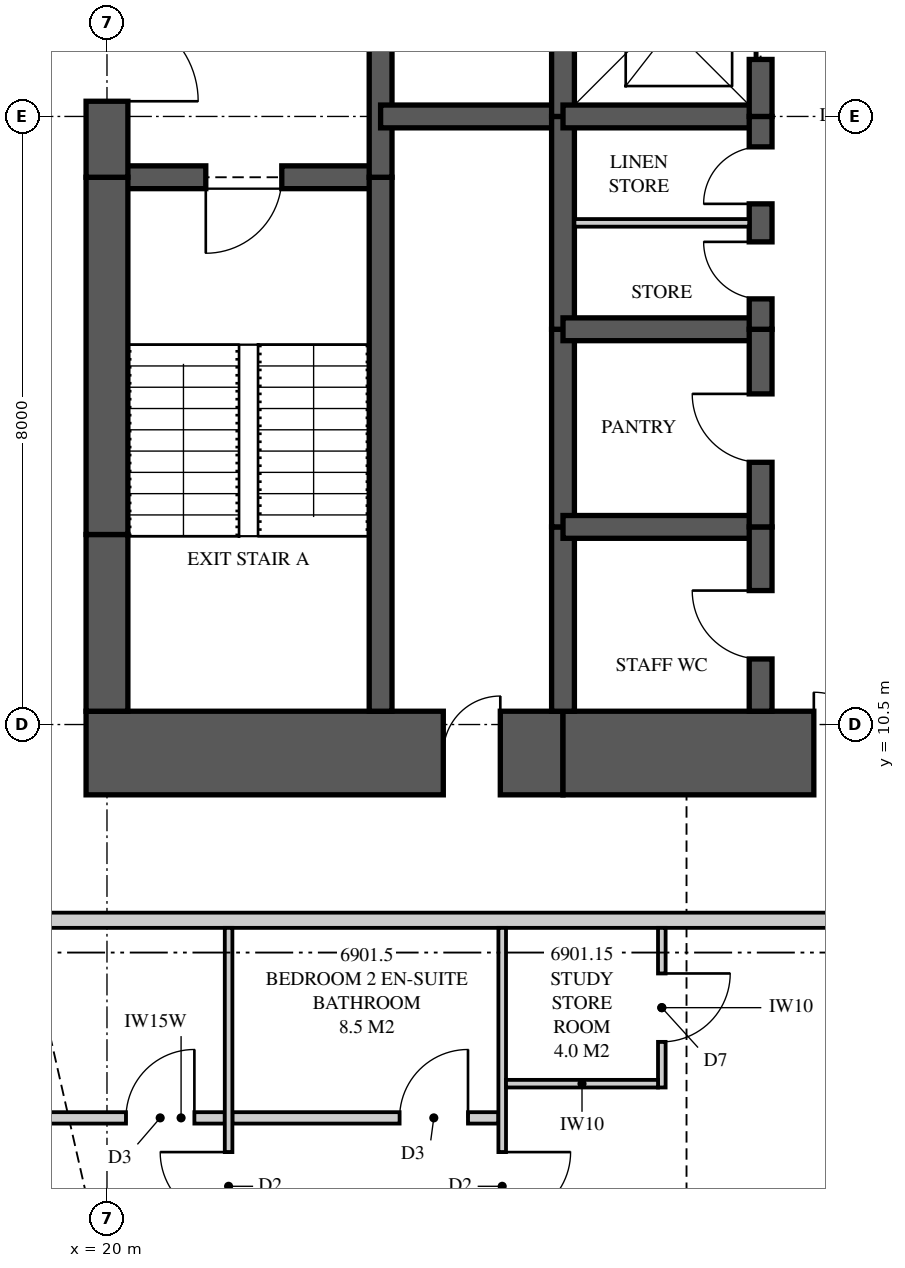
"""IFC4 building model, lengths in metres.
Left out: names, types, materials, properties, quantities, classifications, styles, units other than length and angle.
Written with IfcOpenShell. Run it as: python <this file> out.ifc"""

import sys

from ifc_helpers import new_model, si_unit, direction, frame, frame_2d, origin, place, context, subcontext, project, spatial, polyline, rectangle, outline, extrude, element, fill, save


model = new_model("IFC4")
c1 = context("Model", 3, precision=1e-05, world=origin(), true_north=direction((0.0, 1.0)))
c2 = subcontext(c1, "Body", "Model", "MODEL_VIEW")
j1 = project(units=[si_unit("LENGTHUNIT", "METRE"), si_unit("PLANEANGLEUNIT", "RADIAN")], contexts=[c1])
p1 = place(None, origin())
s1 = spatial("IfcSite", under=j1, at=p1, CompositionType="ELEMENT")
p2 = place(p1, origin())
s2 = spatial("IfcBuilding", under=s1, at=p2, CompositionType="ELEMENT")
p3 = place(p2, frame((0.0, 0.0, 252.95)))
s3 = spatial("IfcBuildingStorey", under=s2, at=p3, CompositionType="ELEMENT", Elevation=252.95)
p4 = place(p3, frame((19.725, 10.125, 0.0), z_axis=(0.0, 0.0, 1.0), x_axis=(1.0, 0.0, 0.0)))
e1 = element("IfcWall", 1, at=p4, inside=s3, PredefinedType="SHEAR", context=c2, shape_type="SweptSolid", body=[
    extrude(rectangle(XDim=6.275, YDim=1.1, at=frame_2d((3.137, 0.0))), origin(), (0.0, 0.0, 1.0), 3.5),
])
p5 = place(p4, frame((4.7, 0.0, 0.0)))
e2 = element("IfcOpeningElement", 2, at=p5, cuts=e1, PredefinedType="OPENING", context=c2, shape_type="SweptSolid", body=[
    extrude(rectangle(XDim=0.75, YDim=2.1, at=frame_2d((0.375, 1.05))), frame((0.0, 0.56, 0.0), z_axis=(0.0, -1.0, 0.0), x_axis=(1.0, 0.0, 0.0)), (0.0, 0.0, 1.0), 1.12),
])
p6 = place(p3, frame((26.0, 10.125, 0.0), z_axis=(0.0, 0.0, 1.0), x_axis=(1.0, 0.0, 0.0)))
e3 = element("IfcWall", 3, at=p6, inside=s3, PredefinedType="SHEAR", context=c2, shape_type="SweptSolid", body=[
    extrude(rectangle(XDim=5.6, YDim=1.1, at=frame_2d((2.8, 0.0))), origin(), (0.0, 0.0, 1.0), 3.5),
])
p7 = place(p6, frame((3.3, 0.0, 0.0)))
e4 = element("IfcOpeningElement", 4, at=p7, cuts=e3, PredefinedType="OPENING", context=c2, shape_type="SweptSolid", body=[
    extrude(rectangle(XDim=1.6, YDim=2.1, at=frame_2d((0.8, 1.05))), frame((0.0, 0.56, 0.0), z_axis=(0.0, -1.0, 0.0), x_axis=(1.0, 0.0, 0.0)), (0.0, 0.0, 1.0), 1.12),
])
p8 = place(p3, frame((20.0, 23.3, 0.0), z_axis=(0.0, 0.0, 1.0), x_axis=(0.0, -1.0, 0.0)))
e5 = element("IfcWall", 5, at=p8, inside=s3, PredefinedType="SHEAR", context=c2, shape_type="SweptSolid", body=[
    extrude(rectangle(XDim=5.6, YDim=0.55, at=frame_2d((2.8, 0.0))), origin(), (0.0, 0.0, 1.0), 3.5),
])
p9 = place(p8, frame((3.4, 0.0, 0.0)))
e6 = element("IfcOpeningElement", 6, at=p9, cuts=e5, PredefinedType="OPENING", context=c2, shape_type="SweptSolid", body=[
    extrude(rectangle(XDim=1.2, YDim=2.2, at=frame_2d((0.6, 1.1))), frame((0.0, 0.285, 0.0), z_axis=(0.0, -1.0, 0.0), x_axis=(1.0, 0.0, 0.0)), (0.0, 0.0, 1.0), 0.57),
])
p10 = place(p3, frame((20.0, 17.7, 0.0), z_axis=(0.0, 0.0, 1.0), x_axis=(0.0, -1.0, 0.0)))
e7 = element("IfcWall", 7, at=p10, inside=s3, PredefinedType="SHEAR", context=c2, shape_type="SweptSolid", body=[
    extrude(rectangle(XDim=4.7, YDim=0.55, at=frame_2d((2.35, 0.0))), origin(), (0.0, 0.0, 1.0), 3.5),
])
p11 = place(p3, frame((20.0, 13.0, 0.0), z_axis=(0.0, 0.0, 1.0), x_axis=(0.0, -1.0, 0.0)))
e8 = element("IfcWall", 8, at=p11, inside=s3, PredefinedType="SHEAR", context=c2, shape_type="SweptSolid", body=[
    extrude(rectangle(XDim=2.325, YDim=0.55, at=frame_2d((1.163, 0.0))), origin(), (0.0, 0.0, 1.0), 3.5),
])
p12 = place(p3, frame((23.6, 10.675, 0.0), z_axis=(0.0, 0.0, 1.0), x_axis=(0.0, 1.0, 0.0)))
e9 = element("IfcWall", 9, at=p12, inside=s3, PredefinedType="SHEAR", context=c2, shape_type="SweptSolid", body=[
    extrude(rectangle(XDim=7.025, YDim=0.3, at=frame_2d((3.512, 0.0))), origin(), (0.0, 0.0, 1.0), 3.5),
])
p13 = place(p3, frame((23.6, 17.7, 0.0), z_axis=(0.0, 0.0, 1.0), x_axis=(0.0, 1.0, 0.0)))
e10 = element("IfcWall", 10, at=p13, inside=s3, PredefinedType="SHEAR", context=c2, shape_type="SweptSolid", body=[
    extrude(rectangle(XDim=5.6, YDim=0.3, at=frame_2d((2.8, 0.0))), origin(), (0.0, 0.0, 1.0), 3.5),
])
p14 = place(p3, frame((26.0, 10.675, 0.0), z_axis=(0.0, 0.0, 1.0), x_axis=(0.0, 1.0, 0.0)))
e11 = element("IfcWall", 11, at=p14, inside=s3, PredefinedType="SHEAR", context=c2, shape_type="SweptSolid", body=[
    extrude(rectangle(XDim=2.425, YDim=0.3, at=frame_2d((1.212, 0.0))), origin(), (0.0, 0.0, 1.0), 3.5),
])
p15 = place(p3, frame((26.0, 13.1, 0.0), z_axis=(0.0, 0.0, 1.0), x_axis=(0.0, 1.0, 0.0)))
e12 = element("IfcWall", 12, at=p15, inside=s3, PredefinedType="SHEAR", context=c2, shape_type="SweptSolid", body=[
    extrude(rectangle(XDim=2.6, YDim=0.3, at=frame_2d((1.3, 0.0))), origin(), (0.0, 0.0, 1.0), 3.5),
])
p16 = place(p3, frame((26.0, 15.7, 0.0), z_axis=(0.0, 0.0, 1.0), x_axis=(0.0, 1.0, 0.0)))
e13 = element("IfcWall", 13, at=p16, inside=s3, PredefinedType="SHEAR", context=c2, shape_type="SweptSolid", body=[
    extrude(rectangle(XDim=2.8, YDim=0.3, at=frame_2d((1.4, 0.0))), origin(), (0.0, 0.0, 1.0), 3.5),
])
p17 = place(p3, frame((26.0, 18.5, 0.0), z_axis=(0.0, 0.0, 1.0), x_axis=(0.0, 1.0, 0.0)))
e14 = element("IfcWall", 14, at=p17, inside=s3, PredefinedType="SHEAR", context=c2, shape_type="SweptSolid", body=[
    extrude(rectangle(XDim=2.6, YDim=0.3, at=frame_2d((1.3, 0.0))), origin(), (0.0, 0.0, 1.0), 3.5),
])
p18 = place(p3, frame((28.6, 10.675, 0.0), z_axis=(0.0, 0.0, 1.0), x_axis=(0.0, 1.0, 0.0)))
e15 = element("IfcWall", 15, at=p18, inside=s3, PredefinedType="SHEAR", context=c2, shape_type="SweptSolid", body=[
    extrude(rectangle(XDim=2.425, YDim=0.3, at=frame_2d((1.212, 0.0))), origin(), (0.0, 0.0, 1.0), 3.5),
])
p19 = place(p18, frame((0.688, 0.0, 0.0)))
e16 = element("IfcOpeningElement", 16, at=p19, cuts=e15, PredefinedType="OPENING", context=c2, shape_type="SweptSolid", body=[
    extrude(rectangle(XDim=0.9, YDim=2.1, at=frame_2d((0.45, 1.05))), frame((0.0, 0.16, 0.0), z_axis=(0.0, -1.0, 0.0), x_axis=(1.0, 0.0, 0.0)), (0.0, 0.0, 1.0), 0.32),
])
p20 = place(p3, frame((28.6, 13.1, 0.0), z_axis=(0.0, 0.0, 1.0), x_axis=(0.0, 1.0, 0.0)))
e17 = element("IfcWall", 17, at=p20, inside=s3, PredefinedType="SHEAR", context=c2, shape_type="SweptSolid", body=[
    extrude(rectangle(XDim=2.6, YDim=0.3, at=frame_2d((1.3, 0.0))), origin(), (0.0, 0.0, 1.0), 3.5),
])
p21 = place(p20, frame((0.85, 0.0, 0.0)))
e18 = element("IfcOpeningElement", 18, at=p21, cuts=e17, PredefinedType="OPENING", context=c2, shape_type="SweptSolid", body=[
    extrude(rectangle(XDim=0.9, YDim=2.1, at=frame_2d((0.45, 1.05))), frame((0.0, 0.16, 0.0), z_axis=(0.0, -1.0, 0.0), x_axis=(1.0, 0.0, 0.0)), (0.0, 0.0, 1.0), 0.32),
])
p22 = place(p3, frame((28.6, 15.7, 0.0), z_axis=(0.0, 0.0, 1.0), x_axis=(0.0, 1.0, 0.0)))
e19 = element("IfcWall", 19, at=p22, inside=s3, PredefinedType="SHEAR", context=c2, shape_type="SweptSolid", body=[
    extrude(rectangle(XDim=2.8, YDim=0.3, at=frame_2d((1.4, 0.0))), origin(), (0.0, 0.0, 1.0), 3.5),
])
p23 = place(p22, frame((0.4, 0.0, 0.0)))
e20 = element("IfcOpeningElement", 20, at=p23, cuts=e19, PredefinedType="OPENING", context=c2, shape_type="SweptSolid", body=[
    extrude(rectangle(XDim=0.75, YDim=2.1, at=frame_2d((0.375, 1.05))), frame((0.0, 0.16, 0.0), z_axis=(0.0, -1.0, 0.0), x_axis=(1.0, 0.0, 0.0)), (0.0, 0.0, 1.0), 0.32),
])
p24 = place(p22, frame((1.65, 0.0, 0.0)))
e21 = element("IfcOpeningElement", 21, at=p24, cuts=e19, PredefinedType="OPENING", context=c2, shape_type="SweptSolid", body=[
    extrude(rectangle(XDim=0.75, YDim=2.1, at=frame_2d((0.375, 1.05))), frame((0.0, 0.16, 0.0), z_axis=(0.0, -1.0, 0.0), x_axis=(1.0, 0.0, 0.0)), (0.0, 0.0, 1.0), 0.32),
])
p25 = place(p3, frame((28.6, 18.5, 0.0), z_axis=(0.0, 0.0, 1.0), x_axis=(0.0, 1.0, 0.0)))
e22 = element("IfcWall", 22, at=p25, inside=s3, PredefinedType="SHEAR", context=c2, shape_type="SweptSolid", body=[
    extrude(rectangle(XDim=2.6, YDim=0.3, at=frame_2d((1.3, 0.0))), origin(), (0.0, 0.0, 1.0), 3.5),
])
p26 = place(p25, frame((0.75, 0.0, 0.0)))
e23 = element("IfcOpeningElement", 23, at=p26, cuts=e22, PredefinedType="OPENING", context=c2, shape_type="SweptSolid", body=[
    extrude(rectangle(XDim=1.1, YDim=2.1, at=frame_2d((0.55, 1.05))), frame((0.0, 0.16, 0.0), z_axis=(0.0, -1.0, 0.0), x_axis=(1.0, 0.0, 0.0)), (0.0, 0.0, 1.0), 0.32),
])
p27 = place(p3, frame((20.0, 17.7, 0.0), z_axis=(0.0, 0.0, 1.0), x_axis=(1.0, 0.0, 0.0)))
e24 = element("IfcWall", 24, at=p27, inside=s3, PredefinedType="SHEAR", context=c2, shape_type="SweptSolid", body=[
    extrude(rectangle(XDim=3.6, YDim=0.3, at=frame_2d((1.8, 0.0))), origin(), (0.0, 0.0, 1.0), 3.5),
])
p28 = place(p27, frame((1.3, 0.0, 0.0)))
e25 = element("IfcOpeningElement", 25, at=p28, cuts=e24, PredefinedType="OPENING", context=c2, shape_type="SweptSolid", body=[
    extrude(rectangle(XDim=1.0, YDim=2.1, at=frame_2d((0.5, 1.05))), frame((0.0, 0.16, 0.0), z_axis=(0.0, -1.0, 0.0), x_axis=(1.0, 0.0, 0.0)), (0.0, 0.0, 1.0), 0.32),
])
p29 = place(p3, frame((23.6, 18.5, 0.0), z_axis=(0.0, 0.0, 1.0), x_axis=(1.0, 0.0, 0.0)))
e26 = element("IfcWall", 26, at=p29, inside=s3, PredefinedType="SHEAR", context=c2, shape_type="SweptSolid", body=[
    extrude(rectangle(XDim=2.4, YDim=0.3, at=frame_2d((1.2, 0.0))), origin(), (0.0, 0.0, 1.0), 3.5),
])
for number, where, z_axis, x_axis in (
    (27, (26.0, 13.1, 0.0), (0.0, 0.0, 1.0), (1.0, 0.0, 0.0)),
    (28, (26.0, 15.7, 0.0), (0.0, 0.0, 1.0), (1.0, 0.0, 0.0)),
    (29, (26.0, 18.5, 0.0), (0.0, 0.0, 1.0), (1.0, 0.0, 0.0)),
):
    element("IfcWall", number, at=place(p3, frame(where, z_axis=z_axis, x_axis=x_axis)), inside=s3, PredefinedType="SHEAR", context=c2, shape_type="SweptSolid", body=[
        extrude(rectangle(XDim=2.6, YDim=0.3, at=frame_2d((1.3, 0.0))), origin(), (0.0, 0.0, 1.0), 3.5),
    ])
p30 = place(p3, frame((18.0, 7.925, 0.0), z_axis=(0.0, 0.0, 1.0), x_axis=(1.0, 0.0, 0.0)))
e30 = element("IfcWall", 30, at=p30, inside=s3, PredefinedType="PARTITIONING", context=c2, shape_type="SweptSolid", body=[
    extrude(outline(polyline([(0.0, 0.0), (38.325, 0.0), (38.325, 3.26), (37.875, 3.26), (37.875, 2.3), (36.043, 2.3), (36.043, 3.26), (30.185, 3.26), (30.185, 2.66), (27.565, 2.66), (27.565, 3.26), (20.56, 3.26), (20.56, 2.66), (17.94, 2.66), (17.94, 3.26), (10.935, 3.26), (10.935, 2.66), (8.315, 2.66), (8.315, 3.26), (1.839, 3.26), (1.839, 2.3), (0.0, 2.3), (0.0, 3.26), (0.0, 0.0)])), frame((0.0, 0.1, 0.0), z_axis=(0.0, -1.0, 0.0), x_axis=(1.0, 0.0, 0.0)), (0.0, 0.0, 1.0), 0.2),
])
p31 = place(p30, frame((18.75, 0.0, 0.0)))
e31 = element("IfcOpeningElement", 31, at=p31, cuts=e30, PredefinedType="OPENING", context=c2, shape_type="SweptSolid", body=[
    extrude(rectangle(XDim=1.05, YDim=2.2, at=frame_2d((0.525, 1.1))), frame((0.0, 0.11, 0.0), z_axis=(0.0, -1.0, 0.0), x_axis=(1.0, 0.0, 0.0)), (0.0, 0.0, 1.0), 0.22),
])
p32 = place(p3, frame((21.6, 0.175, 0.0), z_axis=(0.0, 0.0, 1.0), x_axis=(0.0, 1.0, 0.0)))
e32 = element("IfcWall", 32, at=p32, inside=s3, PredefinedType="PARTITIONING", context=c2, shape_type="SweptSolid", body=[
    extrude(outline(polyline([(0.0, 0.0), (7.65, 0.0), (7.65, 3.26), (2.668, 3.26), (2.668, 2.3), (0.924, 2.3), (0.924, 3.26), (0.0, 3.26), (0.0, 0.0)])), frame((0.0, 0.05, 0.0), z_axis=(0.0, -1.0, 0.0), x_axis=(1.0, 0.0, 0.0)), (0.0, 0.0, 1.0), 0.1),
])
p33 = place(p32, frame((3.8, 0.0, 0.0)))
e33 = element("IfcOpeningElement", 33, at=p33, cuts=e32, PredefinedType="OPENING", context=c2, shape_type="SweptSolid", body=[
    extrude(rectangle(XDim=0.9, YDim=2.1, at=frame_2d((0.45, 1.05))), frame((0.0, 0.06, 0.0), z_axis=(0.0, -1.0, 0.0), x_axis=(1.0, 0.0, 0.0)), (0.0, 0.0, 1.0), 0.12),
])
p34 = place(p3, frame((25.2, 0.175, 0.0), z_axis=(0.0, 0.0, 1.0), x_axis=(0.0, 1.0, 0.0)))
e34 = element("IfcWall", 34, at=p34, inside=s3, PredefinedType="PARTITIONING", context=c2, shape_type="SweptSolid", body=[
    extrude(outline(polyline([(0.0, 0.0), (7.65, 0.0), (7.65, 3.26), (2.058, 3.26), (2.058, 2.3), (0.314, 2.3), (0.314, 3.26), (0.0, 3.26), (0.0, 0.0)])), frame((0.0, 0.05, 0.0), z_axis=(0.0, -1.0, 0.0), x_axis=(1.0, 0.0, 0.0)), (0.0, 0.0, 1.0), 0.1),
])
p35 = place(p34, frame((3.8, 0.0, 0.0)))
e35 = element("IfcOpeningElement", 35, at=p35, cuts=e34, PredefinedType="OPENING", context=c2, shape_type="SweptSolid", body=[
    extrude(rectangle(XDim=0.9, YDim=2.1, at=frame_2d((0.45, 1.05))), frame((0.0, 0.06, 0.0), z_axis=(0.0, -1.0, 0.0), x_axis=(1.0, 0.0, 0.0)), (0.0, 0.0, 1.0), 0.12),
])
p36 = place(p3, frame((16.8, 5.325, 0.0), z_axis=(0.0, 0.0, 1.0), x_axis=(1.0, 0.0, 0.0)))
e36 = element("IfcWall", 36, at=p36, inside=s3, PredefinedType="PLUMBINGWALL", context=c2, shape_type="SweptSolid", body=[
    extrude(outline(polyline([(0.0, 0.0), (4.75, 0.0), (4.75, 3.26), (3.605, 3.26), (3.605, 2.3), (1.79, 2.3), (1.79, 3.26), (0.0, 3.26), (0.0, 0.0)])), frame((0.0, 0.075, 0.0), z_axis=(0.0, -1.0, 0.0), x_axis=(1.0, 0.0, 0.0)), (0.0, 0.0, 1.0), 0.15),
])
p37 = place(p36, frame((3.45, 0.0, 0.0)))
e37 = element("IfcOpeningElement", 37, at=p37, cuts=e36, PredefinedType="OPENING", context=c2, shape_type="SweptSolid", body=[
    extrude(rectangle(XDim=0.9, YDim=2.1, at=frame_2d((0.45, 1.05))), frame((0.0, 0.085, 0.0), z_axis=(0.0, -1.0, 0.0), x_axis=(1.0, 0.0, 0.0)), (0.0, 0.0, 1.0), 0.17),
])
p38 = place(p3, frame((21.65, 5.325, 0.0), z_axis=(0.0, 0.0, 1.0), x_axis=(1.0, 0.0, 0.0)))
e38 = element("IfcWall", 38, at=p38, inside=s3, PredefinedType="PLUMBINGWALL", context=c2, shape_type="SweptSolid", body=[
    extrude(rectangle(XDim=3.5, YDim=0.15, at=frame_2d((1.75, 0.0))), origin(), (0.0, 0.0, 1.0), 3.26),
])
p39 = place(p38, frame((2.2, 0.0, 0.0)))
e39 = element("IfcOpeningElement", 39, at=p39, cuts=e38, PredefinedType="OPENING", context=c2, shape_type="SweptSolid", body=[
    extrude(rectangle(XDim=0.9, YDim=2.1, at=frame_2d((0.45, 1.05))), frame((0.0, 0.085, 0.0), z_axis=(0.0, -1.0, 0.0), x_axis=(1.0, 0.0, 0.0)), (0.0, 0.0, 1.0), 0.17),
])
p40 = place(p3, frame((27.3, 7.825, 0.0), z_axis=(0.0, 0.0, 1.0), x_axis=(0.0, -1.0, 0.0)))
e40 = element("IfcWall", 40, at=p40, inside=s3, PredefinedType="PARTITIONING", context=c2, shape_type="SweptSolid", body=[
    extrude(outline(polyline([(0.0, 0.0), (2.1, 0.0), (2.1, 3.26), (2.1, 2.66), (0.0, 2.66), (0.0, 3.26), (0.0, 0.0)])), frame((0.0, 0.05, 0.0), z_axis=(0.0, -1.0, 0.0), x_axis=(1.0, 0.0, 0.0)), (0.0, 0.0, 1.0), 0.1),
])
p41 = place(p40, frame((0.6, 0.0, 0.0)))
e41 = element("IfcOpeningElement", 41, at=p41, cuts=e40, PredefinedType="OPENING", context=c2, shape_type="SweptSolid", body=[
    extrude(rectangle(XDim=0.9, YDim=2.1, at=frame_2d((0.45, 1.05))), frame((0.0, 0.06, 0.0), z_axis=(0.0, -1.0, 0.0), x_axis=(1.0, 0.0, 0.0)), (0.0, 0.0, 1.0), 0.12),
])
p42 = place(p3, frame((25.25, 5.775, 0.0), z_axis=(0.0, 0.0, 1.0), x_axis=(1.0, 0.0, 0.0)))
e42 = element("IfcWall", 42, at=p42, inside=s3, PredefinedType="PARTITIONING", context=c2, shape_type="SweptSolid", body=[
    extrude(outline(polyline([(0.0, 0.0), (2.0, 0.0), (2.0, 3.26), (2.0, 2.66), (1.115, 2.66), (1.115, 3.26), (0.0, 3.26), (0.0, 0.0)])), frame((0.0, 0.05, 0.0), z_axis=(0.0, -1.0, 0.0), x_axis=(1.0, 0.0, 0.0)), (0.0, 0.0, 1.0), 0.1),
])
p43 = place(p3, frame((26.15, 17.1, 0.0), z_axis=(0.0, 0.0, 1.0), x_axis=(1.0, 0.0, 0.0)))
e43 = element("IfcWall", 43, at=p43, inside=s3, PredefinedType="PARTITIONING", context=c2, shape_type="SweptSolid", body=[
    extrude(rectangle(XDim=2.3, YDim=0.1, at=frame_2d((1.15, 0.0))), origin(), (0.0, 0.0, 1.0), 3.26),
])
p44 = place(p33, origin())
e44 = element("IfcDoor", 44, at=p44, inside=s3, OperationType="SINGLE_SWING_RIGHT", PredefinedType="DOOR", context=c2, shape_type="SweptSolid", body=[
    extrude(rectangle(XDim=0.9, YDim=2.1, at=frame_2d((0.45, 1.05))), frame((0.0, 0.025, 0.0), z_axis=(0.0, -1.0, 0.0), x_axis=(1.0, 0.0, 0.0)), (0.0, 0.0, 1.0), 0.05),
])
fill(e33, e44)
p45 = place(p37, origin())
e45 = element("IfcDoor", 45, at=p45, inside=s3, OperationType="SINGLE_SWING_RIGHT", PredefinedType="DOOR", context=c2, shape_type="SweptSolid", body=[
    extrude(rectangle(XDim=0.9, YDim=2.1, at=frame_2d((0.45, 1.05))), frame((0.0, 0.025, 0.0), z_axis=(0.0, -1.0, 0.0), x_axis=(1.0, 0.0, 0.0)), (0.0, 0.0, 1.0), 0.05),
])
fill(e37, e45)
p46 = place(p35, frame((0.9, 0.0, 0.0), z_axis=(0.0, 0.0, 1.0), x_axis=(-1.0, 0.0, 0.0)))
e46 = element("IfcDoor", 46, at=p46, inside=s3, OperationType="SINGLE_SWING_LEFT", PredefinedType="DOOR", context=c2, shape_type="SweptSolid", body=[
    extrude(rectangle(XDim=0.9, YDim=2.1, at=frame_2d((0.45, 1.05))), frame((0.0, 0.025, 0.0), z_axis=(0.0, -1.0, 0.0), x_axis=(1.0, 0.0, 0.0)), (0.0, 0.0, 1.0), 0.05),
])
fill(e35, e46)
p47 = place(p39, origin())
e47 = element("IfcDoor", 47, at=p47, inside=s3, OperationType="SINGLE_SWING_RIGHT", PredefinedType="DOOR", context=c2, shape_type="SweptSolid", body=[
    extrude(rectangle(XDim=0.9, YDim=2.1, at=frame_2d((0.45, 1.05))), frame((0.0, 0.025, 0.0), z_axis=(0.0, -1.0, 0.0), x_axis=(1.0, 0.0, 0.0)), (0.0, 0.0, 1.0), 0.05),
])
fill(e39, e47)
p48 = place(p41, origin())
e48 = element("IfcDoor", 48, at=p48, inside=s3, OperationType="SINGLE_SWING_LEFT", PredefinedType="DOOR", context=c2, shape_type="SweptSolid", body=[
    extrude(rectangle(XDim=0.9, YDim=2.1, at=frame_2d((0.45, 1.05))), frame((0.0, 0.025, 0.0), z_axis=(0.0, -1.0, 0.0), x_axis=(1.0, 0.0, 0.0)), (0.0, 0.0, 1.0), 0.05),
])
fill(e41, e48)
p49 = place(p28, frame((1.0, 0.0, 0.0), z_axis=(0.0, 0.0, 1.0), x_axis=(-1.0, 0.0, 0.0)))
e49 = element("IfcDoor", 49, at=p49, inside=s3, OperationType="SINGLE_SWING_RIGHT", PredefinedType="DOOR", context=c2, shape_type="SweptSolid", body=[
    extrude(rectangle(XDim=1.0, YDim=2.1, at=frame_2d((0.5, 1.05))), frame((0.0, 0.025, 0.0), z_axis=(0.0, -1.0, 0.0), x_axis=(1.0, 0.0, 0.0)), (0.0, 0.0, 1.0), 0.05),
])
fill(e25, e49)
p50 = place(p9, origin())
e50 = element("IfcDoor", 50, at=p50, inside=s3, OperationType="SINGLE_SWING_RIGHT", PredefinedType="DOOR", context=c2, shape_type="SweptSolid", body=[
    extrude(rectangle(XDim=1.2, YDim=2.2, at=frame_2d((0.6, 1.1))), frame((0.0, 0.025, 0.0), z_axis=(0.0, -1.0, 0.0), x_axis=(1.0, 0.0, 0.0)), (0.0, 0.0, 1.0), 0.05),
])
fill(e6, e50)
p51 = place(p26, origin())
e51 = element("IfcDoor", 51, at=p51, inside=s3, OperationType="SLIDING_TO_LEFT", PredefinedType="DOOR", context=c2, shape_type="SweptSolid", body=[
    extrude(rectangle(XDim=1.1, YDim=2.1, at=frame_2d((0.55, 1.05))), frame((0.0, 0.025, 0.0), z_axis=(0.0, -1.0, 0.0), x_axis=(1.0, 0.0, 0.0)), (0.0, 0.0, 1.0), 0.05),
])
fill(e23, e51)
p52 = place(p19, origin())
e52 = element("IfcDoor", 52, at=p52, inside=s3, OperationType="SINGLE_SWING_RIGHT", PredefinedType="DOOR", context=c2, shape_type="SweptSolid", body=[
    extrude(rectangle(XDim=0.9, YDim=2.1, at=frame_2d((0.45, 1.05))), frame((0.0, 0.025, 0.0), z_axis=(0.0, -1.0, 0.0), x_axis=(1.0, 0.0, 0.0)), (0.0, 0.0, 1.0), 0.05),
])
fill(e16, e52)
p53 = place(p21, origin())
e53 = element("IfcDoor", 53, at=p53, inside=s3, OperationType="SINGLE_SWING_RIGHT", PredefinedType="DOOR", context=c2, shape_type="SweptSolid", body=[
    extrude(rectangle(XDim=0.9, YDim=2.1, at=frame_2d((0.45, 1.05))), frame((0.0, 0.025, 0.0), z_axis=(0.0, -1.0, 0.0), x_axis=(1.0, 0.0, 0.0)), (0.0, 0.0, 1.0), 0.05),
])
fill(e18, e53)
p54 = place(p23, origin())
e54 = element("IfcDoor", 54, at=p54, inside=s3, OperationType="SINGLE_SWING_RIGHT", PredefinedType="DOOR", context=c2, shape_type="SweptSolid", body=[
    extrude(rectangle(XDim=0.75, YDim=2.1, at=frame_2d((0.375, 1.05))), frame((0.0, 0.025, 0.0), z_axis=(0.0, -1.0, 0.0), x_axis=(1.0, 0.0, 0.0)), (0.0, 0.0, 1.0), 0.05),
])
fill(e20, e54)
p55 = place(p24, origin())
e55 = element("IfcDoor", 55, at=p55, inside=s3, OperationType="SINGLE_SWING_LEFT", PredefinedType="DOOR", context=c2, shape_type="SweptSolid", body=[
    extrude(rectangle(XDim=0.75, YDim=2.1, at=frame_2d((0.375, 1.05))), frame((0.0, 0.025, 0.0), z_axis=(0.0, -1.0, 0.0), x_axis=(1.0, 0.0, 0.0)), (0.0, 0.0, 1.0), 0.05),
])
fill(e21, e55)
p56 = place(p7, origin())
e56 = element("IfcDoor", 56, at=p56, inside=s3, OperationType="DOUBLE_DOOR_SINGLE_SWING", PredefinedType="DOOR", context=c2, shape_type="SweptSolid", body=[
    extrude(rectangle(XDim=1.6, YDim=2.1, at=frame_2d((0.8, 1.05))), frame((0.0, 0.025, 0.0), z_axis=(0.0, -1.0, 0.0), x_axis=(1.0, 0.0, 0.0)), (0.0, 0.0, 1.0), 0.05),
])
fill(e4, e56)
p57 = place(p5, origin())
e57 = element("IfcDoor", 57, at=p57, inside=s3, OperationType="SINGLE_SWING_RIGHT", PredefinedType="DOOR", context=c2, shape_type="SweptSolid", body=[
    extrude(rectangle(XDim=0.75, YDim=2.1, at=frame_2d((0.375, 1.05))), frame((0.0, 0.025, 0.0), z_axis=(0.0, -1.0, 0.0), x_axis=(1.0, 0.0, 0.0)), (0.0, 0.0, 1.0), 0.05),
])
fill(e2, e57)
save(model, sys.argv[1])
